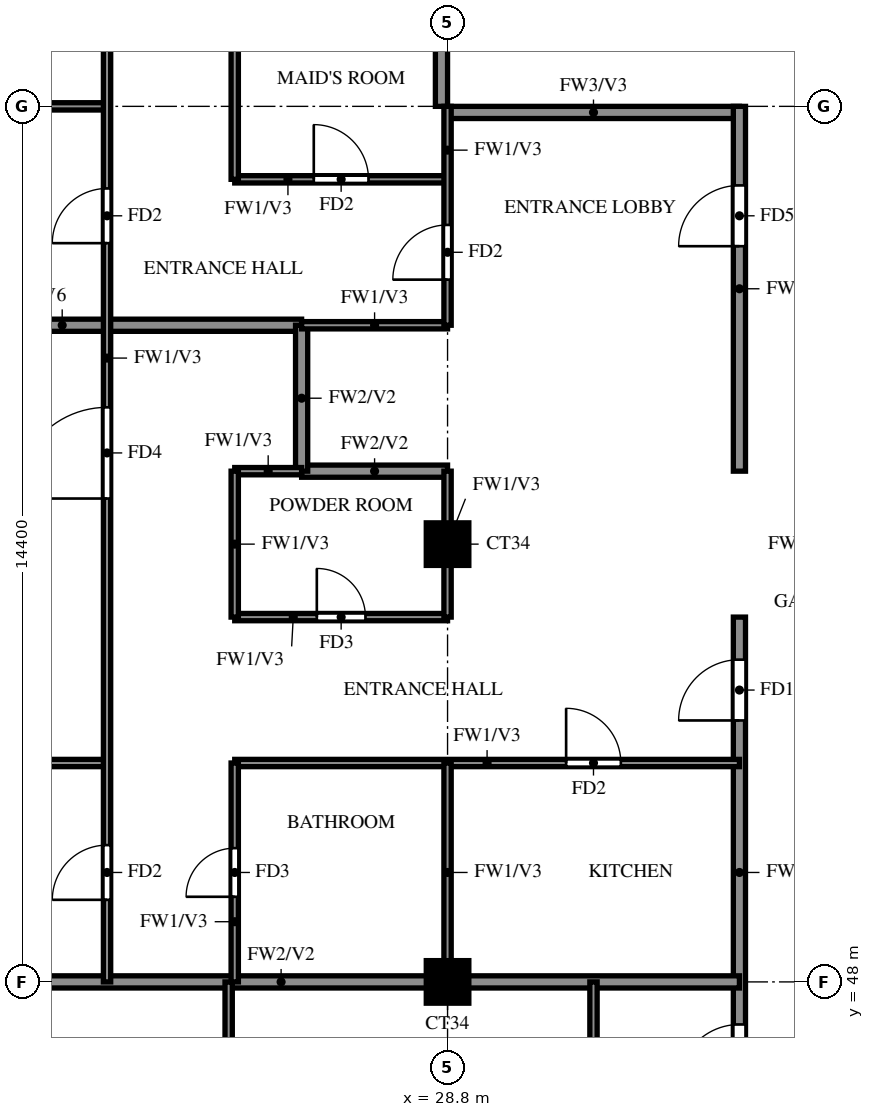
"""IFC4 building model, lengths in metres.
Left out: names, types, materials, properties, quantities, classifications, styles, units other than length and angle.
Written with IfcOpenShell. Run it as: python <this file> out.ifc"""

import sys

from ifc_helpers import new_model, si_unit, direction, frame, frame_2d, origin, origin_2d, place, context, subcontext, project, spatial, rectangle, extrude, source, transform, mapped, element, fill, save


model = new_model("IFC4")
c1 = context("Model", 3, precision=1e-05, world=origin(), true_north=direction((0.0, 1.0)))
c2 = subcontext(c1, "Body", "Model", "MODEL_VIEW")
j1 = project(units=[si_unit("LENGTHUNIT", "METRE"), si_unit("PLANEANGLEUNIT", "RADIAN")], contexts=[c1])
p1 = place(None, origin())
s1 = spatial("IfcSite", under=j1, at=p1, CompositionType="ELEMENT")
p2 = place(p1, origin())
s2 = spatial("IfcBuilding", under=s1, at=p2, CompositionType="ELEMENT")
p3 = place(p2, frame((0.0, 0.0, 257.0)))
s3 = spatial("IfcBuildingStorey", under=s2, at=p3, CompositionType="ELEMENT", Elevation=257.0)
m1 = source(origin(), c2, "Body", "SweptSolid", [
    extrude(rectangle(XDim=0.7, YDim=0.7, at=origin_2d()), origin(), (0.0, 0.0, 1.0), 3.22),
])
for number, where, z_axis, x_axis in (
    (1, (28.8, 48.0, 0.0), (0.0, 0.0, 1.0), (1.0, 0.0, 0.0)),
    (2, (28.8, 55.2, 0.0), (0.0, 0.0, 1.0), (1.0, 0.0, 0.0)),
):
    element("IfcColumn", number, at=place(p3, frame(where, z_axis=z_axis, x_axis=x_axis)), inside=s3, PredefinedType="COLUMN", context=c2, shape_type="MappedRepresentation", body=[
        mapped(m1, transform((0.0, 0.0, 0.0))),
    ])
p4 = place(p3, frame((28.8, 62.3, 0.0), z_axis=(0.0, 0.0, 1.0), x_axis=(1.0, 0.0, 0.0)))
e3 = element("IfcWall", 3, at=p4, inside=s3, PredefinedType="SOLIDWALL", context=c2, shape_type="SweptSolid", body=[
    extrude(rectangle(XDim=4.8, YDim=0.2, at=frame_2d((2.4, 0.0))), origin(), (0.0, 0.0, 1.0), 3.22),
])
p5 = place(p3, frame((28.7, 62.4, 0.0), z_axis=(0.0, 0.0, 1.0), x_axis=(0.0, 1.0, 0.0)))
e4 = element("IfcWall", 4, at=p5, inside=s3, PredefinedType="SOLIDWALL", context=c2, shape_type="SweptSolid", body=[
    extrude(rectangle(XDim=15.6, YDim=0.2, at=frame_2d((7.8, 0.0))), origin(), (0.0, 0.0, 1.0), 3.22),
])
p6 = place(p3, frame((33.6, 45.6, 0.0), z_axis=(0.0, 0.0, 1.0), x_axis=(0.0, 1.0, 0.0)))
e5 = element("IfcWall", 5, at=p6, inside=s3, PredefinedType="SOLIDWALL", context=c2, shape_type="SweptSolid", body=[
    extrude(rectangle(XDim=8.4, YDim=0.2, at=frame_2d((4.2, 0.0))), origin(), (0.0, 0.0, 1.0), 3.22),
])
p7 = place(p6, frame((0.7, 0.0, 0.0)))
e6 = element("IfcOpeningElement", 6, at=p7, cuts=e5, PredefinedType="OPENING", context=c2, shape_type="SweptSolid", body=[
    extrude(rectangle(XDim=1.0, YDim=2.1, at=frame_2d((0.5, 1.05))), frame((0.0, 0.11, 0.0), z_axis=(0.0, -1.0, 0.0), x_axis=(1.0, 0.0, 0.0)), (0.0, 0.0, 1.0), 0.22),
])
p8 = place(p6, frame((6.7, 0.0, 0.0)))
e7 = element("IfcOpeningElement", 7, at=p8, cuts=e5, PredefinedType="OPENING", context=c2, shape_type="SweptSolid", body=[
    extrude(rectangle(XDim=1.0, YDim=2.1, at=frame_2d((0.5, 1.05))), frame((0.0, 0.11, 0.0), z_axis=(0.0, -1.0, 0.0), x_axis=(1.0, 0.0, 0.0)), (0.0, 0.0, 1.0), 0.22),
])
p9 = place(p3, frame((33.6, 56.4, 0.0), z_axis=(0.0, 0.0, 1.0), x_axis=(0.0, 1.0, 0.0)))
e8 = element("IfcWall", 8, at=p9, inside=s3, PredefinedType="SOLIDWALL", context=c2, shape_type="SweptSolid", body=[
    extrude(rectangle(XDim=6.0, YDim=0.2, at=frame_2d((3.0, 0.0))), origin(), (0.0, 0.0, 1.0), 3.22),
])
p10 = place(p9, frame((3.7, 0.0, 0.0)))
e9 = element("IfcOpeningElement", 9, at=p10, cuts=e8, PredefinedType="OPENING", context=c2, shape_type="SweptSolid", body=[
    extrude(rectangle(XDim=1.0, YDim=2.1, at=frame_2d((0.5, 1.05))), frame((0.0, 0.11, 0.0), z_axis=(0.0, -1.0, 0.0), x_axis=(1.0, 0.0, 0.0)), (0.0, 0.0, 1.0), 0.22),
])
p11 = place(p3, frame((18.525, 48.0, 0.0), z_axis=(0.0, 0.0, 1.0), x_axis=(1.0, 0.0, 0.0)))
e10 = element("IfcWall", 10, at=p11, inside=s3, PredefinedType="SOLIDWALL", context=c2, shape_type="SweptSolid", body=[
    extrude(rectangle(XDim=15.075, YDim=0.2, at=frame_2d((7.538, 0.0))), origin(), (0.0, 0.0, 1.0), 3.22),
])
p12 = place(p3, frame((26.4, 56.4, 0.0), z_axis=(0.0, 0.0, 1.0), x_axis=(1.0, 0.0, 0.0)))
e11 = element("IfcWall", 11, at=p12, inside=s3, PredefinedType="SOLIDWALL", context=c2, shape_type="SweptSolid", body=[
    extrude(rectangle(XDim=2.4, YDim=0.2, at=frame_2d((1.2, 0.0))), origin(), (0.0, 0.0, 1.0), 3.22),
])
p13 = place(p3, frame((18.525, 58.8, 0.0), z_axis=(0.0, 0.0, 1.0), x_axis=(1.0, 0.0, 0.0)))
e12 = element("IfcWall", 12, at=p13, inside=s3, PredefinedType="SOLIDWALL", context=c2, shape_type="SweptSolid", body=[
    extrude(rectangle(XDim=7.875, YDim=0.2, at=frame_2d((3.938, 0.0))), origin(), (0.0, 0.0, 1.0), 2.32),
])
p14 = place(p3, frame((26.4, 56.4, 0.0), z_axis=(0.0, 0.0, 1.0), x_axis=(0.0, 1.0, 0.0)))
e13 = element("IfcWall", 13, at=p14, inside=s3, PredefinedType="SOLIDWALL", context=c2, shape_type="SweptSolid", body=[
    extrude(rectangle(XDim=2.4, YDim=0.2, at=frame_2d((1.2, 0.0))), origin(), (0.0, 0.0, 1.0), 3.22),
])
p15 = place(p3, frame((18.525, 51.6, 0.0), z_axis=(0.0, 0.0, 1.0), x_axis=(1.0, 0.0, 0.0)))
e14 = element("IfcWall", 14, at=p15, inside=s3, PredefinedType="PARTITIONING", context=c2, shape_type="SweptSolid", body=[
    extrude(rectangle(XDim=4.675, YDim=0.12, at=frame_2d((2.337, 0.0))), origin(), (0.0, 0.0, 1.0), 2.32),
])
p16 = place(p3, frame((25.3, 51.6, 0.0), z_axis=(0.0, 0.0, 1.0), x_axis=(1.0, 0.0, 0.0)))
e15 = element("IfcWall", 15, at=p16, inside=s3, PredefinedType="PARTITIONING", context=c2, shape_type="SweptSolid", body=[
    extrude(rectangle(XDim=8.3, YDim=0.12, at=frame_2d((4.15, 0.0))), origin(), (0.0, 0.0, 1.0), 3.22),
])
p17 = place(p16, frame((5.45, 0.0, 0.0)))
e16 = element("IfcOpeningElement", 16, at=p17, cuts=e15, PredefinedType="OPENING", context=c2, shape_type="SweptSolid", body=[
    extrude(rectangle(XDim=0.9, YDim=2.1, at=frame_2d((0.45, 1.05))), frame((0.0, 0.07, 0.0), z_axis=(0.0, -1.0, 0.0), x_axis=(1.0, 0.0, 0.0)), (0.0, 0.0, 1.0), 0.14),
])
p18 = place(p3, frame((25.3, 54.0, 0.0), z_axis=(0.0, 0.0, 1.0), x_axis=(1.0, 0.0, 0.0)))
e17 = element("IfcWall", 17, at=p18, inside=s3, PredefinedType="PARTITIONING", context=c2, shape_type="SweptSolid", body=[
    extrude(rectangle(XDim=3.5, YDim=0.12, at=frame_2d((1.75, 0.0))), origin(), (0.0, 0.0, 1.0), 3.22),
])
p19 = place(p18, frame((1.35, 0.0, 0.0)))
e18 = element("IfcOpeningElement", 18, at=p19, cuts=e17, PredefinedType="OPENING", context=c2, shape_type="SweptSolid", body=[
    extrude(rectangle(XDim=0.8, YDim=2.1, at=frame_2d((0.4, 1.05))), frame((0.0, 0.07, 0.0), z_axis=(0.0, -1.0, 0.0), x_axis=(1.0, 0.0, 0.0)), (0.0, 0.0, 1.0), 0.14),
])
p20 = place(p3, frame((25.3, 56.4, 0.0), z_axis=(0.0, 0.0, 1.0), x_axis=(1.0, 0.0, 0.0)))
e19 = element("IfcWall", 19, at=p20, inside=s3, PredefinedType="PARTITIONING", context=c2, shape_type="SweptSolid", body=[
    extrude(rectangle(XDim=1.1, YDim=0.12, at=frame_2d((0.55, 0.0))), origin(), (0.0, 0.0, 1.0), 3.22),
])
p21 = place(p3, frame((26.4, 58.8, 0.0), z_axis=(0.0, 0.0, 1.0), x_axis=(1.0, 0.0, 0.0)))
e20 = element("IfcWall", 20, at=p21, inside=s3, PredefinedType="PARTITIONING", context=c2, shape_type="SweptSolid", body=[
    extrude(rectangle(XDim=2.4, YDim=0.12, at=frame_2d((1.2, 0.0))), origin(), (0.0, 0.0, 1.0), 3.22),
])
p22 = place(p3, frame((25.3, 61.2, 0.0), z_axis=(0.0, 0.0, 1.0), x_axis=(1.0, 0.0, 0.0)))
e21 = element("IfcWall", 21, at=p22, inside=s3, PredefinedType="PARTITIONING", context=c2, shape_type="SweptSolid", body=[
    extrude(rectangle(XDim=3.5, YDim=0.12, at=frame_2d((1.75, 0.0))), origin(), (0.0, 0.0, 1.0), 3.22),
])
p23 = place(p22, frame((1.3, 0.0, 0.0)))
e22 = element("IfcOpeningElement", 22, at=p23, cuts=e21, PredefinedType="OPENING", context=c2, shape_type="SweptSolid", body=[
    extrude(rectangle(XDim=0.9, YDim=2.1, at=frame_2d((0.45, 1.05))), frame((0.0, 0.07, 0.0), z_axis=(0.0, -1.0, 0.0), x_axis=(1.0, 0.0, 0.0)), (0.0, 0.0, 1.0), 0.14),
])
p24 = place(p3, frame((18.525, 62.4, 0.0), z_axis=(0.0, 0.0, 1.0), x_axis=(1.0, 0.0, 0.0)))
e23 = element("IfcWall", 23, at=p24, inside=s3, PredefinedType="PARTITIONING", context=c2, shape_type="SweptSolid", body=[
    extrude(rectangle(XDim=4.675, YDim=0.12, at=frame_2d((2.337, 0.0))), origin(), (0.0, 0.0, 1.0), 3.22),
])
p25 = place(p3, frame((23.2, 48.0, 0.0), z_axis=(0.0, 0.0, 1.0), x_axis=(0.0, 1.0, 0.0)))
e24 = element("IfcWall", 24, at=p25, inside=s3, PredefinedType="PARTITIONING", context=c2, shape_type="SweptSolid", body=[
    extrude(rectangle(XDim=21.6, YDim=0.12, at=frame_2d((10.8, 0.0))), origin(), (0.0, 0.0, 1.0), 3.22),
])
p26 = place(p25, frame((1.35, 0.0, 0.0)))
e25 = element("IfcOpeningElement", 25, at=p26, cuts=e24, PredefinedType="OPENING", context=c2, shape_type="SweptSolid", body=[
    extrude(rectangle(XDim=0.9, YDim=2.1, at=frame_2d((0.45, 1.05))), frame((0.0, 0.07, 0.0), z_axis=(0.0, -1.0, 0.0), x_axis=(1.0, 0.0, 0.0)), (0.0, 0.0, 1.0), 0.14),
])
p27 = place(p25, frame((7.95, 0.0, 0.0)))
e26 = element("IfcOpeningElement", 26, at=p27, cuts=e24, PredefinedType="OPENING", context=c2, shape_type="SweptSolid", body=[
    extrude(rectangle(XDim=1.5, YDim=2.1, at=frame_2d((0.75, 1.05))), frame((0.0, 0.07, 0.0), z_axis=(0.0, -1.0, 0.0), x_axis=(1.0, 0.0, 0.0)), (0.0, 0.0, 1.0), 0.14),
])
p28 = place(p25, frame((12.15, 0.0, 0.0)))
e27 = element("IfcOpeningElement", 27, at=p28, cuts=e24, PredefinedType="OPENING", context=c2, shape_type="SweptSolid", body=[
    extrude(rectangle(XDim=0.9, YDim=2.1, at=frame_2d((0.45, 1.05))), frame((0.0, 0.07, 0.0), z_axis=(0.0, -1.0, 0.0), x_axis=(1.0, 0.0, 0.0)), (0.0, 0.0, 1.0), 0.14),
])
p29 = place(p25, frame((17.55, 0.0, 0.0)))
e28 = element("IfcOpeningElement", 28, at=p29, cuts=e24, PredefinedType="OPENING", context=c2, shape_type="SweptSolid", body=[
    extrude(rectangle(XDim=0.9, YDim=2.1, at=frame_2d((0.45, 1.05))), frame((0.0, 0.07, 0.0), z_axis=(0.0, -1.0, 0.0), x_axis=(1.0, 0.0, 0.0)), (0.0, 0.0, 1.0), 0.14),
])
p30 = place(p3, frame((25.2, 39.725, 0.0), z_axis=(0.0, 0.0, 1.0), x_axis=(0.0, 1.0, 0.0)))
e29 = element("IfcWall", 29, at=p30, inside=s3, PredefinedType="PARTITIONING", context=c2, shape_type="SweptSolid", body=[
    extrude(rectangle(XDim=8.275, YDim=0.12, at=frame_2d((4.137, 0.0))), origin(), (0.0, 0.0, 1.0), 3.22),
])
p31 = place(p30, frame((4.525, 0.0, 0.0)))
e30 = element("IfcOpeningElement", 30, at=p31, cuts=e29, PredefinedType="OPENING", context=c2, shape_type="SweptSolid", body=[
    extrude(rectangle(XDim=0.9, YDim=2.1, at=frame_2d((0.45, 1.05))), frame((0.0, 0.07, 0.0), z_axis=(0.0, -1.0, 0.0), x_axis=(1.0, 0.0, 0.0)), (0.0, 0.0, 1.0), 0.14),
])
p32 = place(p3, frame((25.3, 48.0, 0.0), z_axis=(0.0, 0.0, 1.0), x_axis=(0.0, 1.0, 0.0)))
e31 = element("IfcWall", 31, at=p32, inside=s3, PredefinedType="PARTITIONING", context=c2, shape_type="SweptSolid", body=[
    extrude(rectangle(XDim=3.6, YDim=0.12, at=frame_2d((1.8, 0.0))), origin(), (0.0, 0.0, 1.0), 3.22),
])
p33 = place(p32, frame((1.4, 0.0, 0.0)))
e32 = element("IfcOpeningElement", 32, at=p33, cuts=e31, PredefinedType="OPENING", context=c2, shape_type="SweptSolid", body=[
    extrude(rectangle(XDim=0.8, YDim=2.1, at=frame_2d((0.4, 1.05))), frame((0.0, 0.07, 0.0), z_axis=(0.0, -1.0, 0.0), x_axis=(1.0, 0.0, 0.0)), (0.0, 0.0, 1.0), 0.14),
])
p34 = place(p3, frame((25.3, 54.0, 0.0), z_axis=(0.0, 0.0, 1.0), x_axis=(0.0, 1.0, 0.0)))
e33 = element("IfcWall", 33, at=p34, inside=s3, PredefinedType="PARTITIONING", context=c2, shape_type="SweptSolid", body=[
    extrude(rectangle(XDim=2.4, YDim=0.12, at=frame_2d((1.2, 0.0))), origin(), (0.0, 0.0, 1.0), 3.22),
])
p35 = place(p3, frame((25.3, 61.2, 0.0), z_axis=(0.0, 0.0, 1.0), x_axis=(0.0, 1.0, 0.0)))
e34 = element("IfcWall", 34, at=p35, inside=s3, PredefinedType="PARTITIONING", context=c2, shape_type="SweptSolid", body=[
    extrude(rectangle(XDim=12.0, YDim=0.12, at=frame_2d((6.0, 0.0))), origin(), (0.0, 0.0, 1.0), 3.22),
])
p36 = place(p35, frame((5.3, 0.0, 0.0)))
e35 = element("IfcOpeningElement", 35, at=p36, cuts=e34, PredefinedType="OPENING", context=c2, shape_type="SweptSolid", body=[
    extrude(rectangle(XDim=0.9, YDim=2.1, at=frame_2d((0.45, 1.05))), frame((0.0, 0.07, 0.0), z_axis=(0.0, -1.0, 0.0), x_axis=(1.0, 0.0, 0.0)), (0.0, 0.0, 1.0), 0.14),
])
p37 = place(p35, frame((9.7, 0.0, 0.0)))
e36 = element("IfcOpeningElement", 36, at=p37, cuts=e34, PredefinedType="OPENING", context=c2, shape_type="SweptSolid", body=[
    extrude(rectangle(XDim=0.8, YDim=2.1, at=frame_2d((0.4, 1.05))), frame((0.0, 0.07, 0.0), z_axis=(0.0, -1.0, 0.0), x_axis=(1.0, 0.0, 0.0)), (0.0, 0.0, 1.0), 0.14),
])
p38 = place(p3, frame((28.8, 48.0, 0.0), z_axis=(0.0, 0.0, 1.0), x_axis=(0.0, 1.0, 0.0)))
e37 = element("IfcWall", 37, at=p38, inside=s3, PredefinedType="PARTITIONING", context=c2, shape_type="SweptSolid", body=[
    extrude(rectangle(XDim=3.6, YDim=0.12, at=frame_2d((1.8, 0.0))), origin(), (0.0, 0.0, 1.0), 3.22),
])
p39 = place(p3, frame((28.8, 54.0, 0.0), z_axis=(0.0, 0.0, 1.0), x_axis=(0.0, 1.0, 0.0)))
e38 = element("IfcWall", 38, at=p39, inside=s3, PredefinedType="PARTITIONING", context=c2, shape_type="SweptSolid", body=[
    extrude(rectangle(XDim=2.4, YDim=0.12, at=frame_2d((1.2, 0.0))), origin(), (0.0, 0.0, 1.0), 3.22),
])
p40 = place(p3, frame((28.8, 58.8, 0.0), z_axis=(0.0, 0.0, 1.0), x_axis=(0.0, 1.0, 0.0)))
e39 = element("IfcWall", 39, at=p40, inside=s3, PredefinedType="PARTITIONING", context=c2, shape_type="SweptSolid", body=[
    extrude(rectangle(XDim=3.6, YDim=0.12, at=frame_2d((1.8, 0.0))), origin(), (0.0, 0.0, 1.0), 3.22),
])
p41 = place(p40, frame((0.75, 0.0, 0.0)))
e40 = element("IfcOpeningElement", 40, at=p41, cuts=e39, PredefinedType="OPENING", context=c2, shape_type="SweptSolid", body=[
    extrude(rectangle(XDim=0.9, YDim=2.1, at=frame_2d((0.45, 1.05))), frame((0.0, 0.07, 0.0), z_axis=(0.0, -1.0, 0.0), x_axis=(1.0, 0.0, 0.0)), (0.0, 0.0, 1.0), 0.14),
])
p42 = place(p3, frame((31.2, 45.6, 0.0), z_axis=(0.0, 0.0, 1.0), x_axis=(0.0, 1.0, 0.0)))
e41 = element("IfcWall", 41, at=p42, inside=s3, PredefinedType="PARTITIONING", context=c2, shape_type="SweptSolid", body=[
    extrude(rectangle(XDim=2.4, YDim=0.12, at=frame_2d((1.2, 0.0))), origin(), (0.0, 0.0, 1.0), 3.22),
])
p43 = place(p7, origin())
e42 = element("IfcDoor", 42, at=p43, inside=s3, OperationType="SINGLE_SWING_RIGHT", PredefinedType="DOOR", context=c2, shape_type="SweptSolid", body=[
    extrude(rectangle(XDim=1.0, YDim=2.1, at=frame_2d((0.5, 1.05))), frame((0.0, 0.025, 0.0), z_axis=(0.0, -1.0, 0.0), x_axis=(1.0, 0.0, 0.0)), (0.0, 0.0, 1.0), 0.05),
])
fill(e6, e42)
p44 = place(p8, origin())
e43 = element("IfcDoor", 43, at=p44, inside=s3, OperationType="SINGLE_SWING_RIGHT", PredefinedType="DOOR", context=c2, shape_type="SweptSolid", body=[
    extrude(rectangle(XDim=1.0, YDim=2.1, at=frame_2d((0.5, 1.05))), frame((0.0, 0.025, 0.0), z_axis=(0.0, -1.0, 0.0), x_axis=(1.0, 0.0, 0.0)), (0.0, 0.0, 1.0), 0.05),
])
fill(e7, e43)
p45 = place(p26, origin())
e44 = element("IfcDoor", 44, at=p45, inside=s3, OperationType="SINGLE_SWING_LEFT", PredefinedType="DOOR", context=c2, shape_type="SweptSolid", body=[
    extrude(rectangle(XDim=0.9, YDim=2.1, at=frame_2d((0.45, 1.05))), frame((0.0, 0.025, 0.0), z_axis=(0.0, -1.0, 0.0), x_axis=(1.0, 0.0, 0.0)), (0.0, 0.0, 1.0), 0.05),
])
fill(e25, e44)
p46 = place(p27, origin())
e45 = element("IfcDoor", 45, at=p46, inside=s3, OperationType="SINGLE_SWING_RIGHT", PredefinedType="DOOR", context=c2, shape_type="SweptSolid", body=[
    extrude(rectangle(XDim=1.5, YDim=2.1, at=frame_2d((0.75, 1.05))), frame((0.0, 0.025, 0.0), z_axis=(0.0, -1.0, 0.0), x_axis=(1.0, 0.0, 0.0)), (0.0, 0.0, 1.0), 0.05),
])
fill(e26, e45)
p47 = place(p33, origin())
e46 = element("IfcDoor", 46, at=p47, inside=s3, OperationType="SINGLE_SWING_RIGHT", PredefinedType="DOOR", context=c2, shape_type="SweptSolid", body=[
    extrude(rectangle(XDim=0.8, YDim=2.1, at=frame_2d((0.4, 1.05))), frame((0.0, 0.025, 0.0), z_axis=(0.0, -1.0, 0.0), x_axis=(1.0, 0.0, 0.0)), (0.0, 0.0, 1.0), 0.05),
])
fill(e32, e46)
p48 = place(p19, origin())
e47 = element("IfcDoor", 47, at=p48, inside=s3, OperationType="SINGLE_SWING_LEFT", PredefinedType="DOOR", context=c2, shape_type="SweptSolid", body=[
    extrude(rectangle(XDim=0.8, YDim=2.1, at=frame_2d((0.4, 1.05))), frame((0.0, 0.025, 0.0), z_axis=(0.0, -1.0, 0.0), x_axis=(1.0, 0.0, 0.0)), (0.0, 0.0, 1.0), 0.05),
])
fill(e18, e47)
p49 = place(p17, origin())
e48 = element("IfcDoor", 48, at=p49, inside=s3, OperationType="SINGLE_SWING_LEFT", PredefinedType="DOOR", context=c2, shape_type="SweptSolid", body=[
    extrude(rectangle(XDim=0.9, YDim=2.1, at=frame_2d((0.45, 1.05))), frame((0.0, 0.025, 0.0), z_axis=(0.0, -1.0, 0.0), x_axis=(1.0, 0.0, 0.0)), (0.0, 0.0, 1.0), 0.05),
])
fill(e16, e48)
p50 = place(p41, origin())
e49 = element("IfcDoor", 49, at=p50, inside=s3, OperationType="SINGLE_SWING_LEFT", PredefinedType="DOOR", context=c2, shape_type="SweptSolid", body=[
    extrude(rectangle(XDim=0.9, YDim=2.1, at=frame_2d((0.45, 1.05))), frame((0.0, 0.025, 0.0), z_axis=(0.0, -1.0, 0.0), x_axis=(1.0, 0.0, 0.0)), (0.0, 0.0, 1.0), 0.05),
])
fill(e40, e49)
p51 = place(p10, origin())
e50 = element("IfcDoor", 50, at=p51, inside=s3, OperationType="SINGLE_SWING_LEFT", PredefinedType="DOOR", context=c2, shape_type="SweptSolid", body=[
    extrude(rectangle(XDim=1.0, YDim=2.1, at=frame_2d((0.5, 1.05))), frame((0.0, 0.025, 0.0), z_axis=(0.0, -1.0, 0.0), x_axis=(1.0, 0.0, 0.0)), (0.0, 0.0, 1.0), 0.05),
])
fill(e9, e50)
p52 = place(p28, origin())
e51 = element("IfcDoor", 51, at=p52, inside=s3, OperationType="SINGLE_SWING_RIGHT", PredefinedType="DOOR", context=c2, shape_type="SweptSolid", body=[
    extrude(rectangle(XDim=0.9, YDim=2.1, at=frame_2d((0.45, 1.05))), frame((0.0, 0.025, 0.0), z_axis=(0.0, -1.0, 0.0), x_axis=(1.0, 0.0, 0.0)), (0.0, 0.0, 1.0), 0.05),
])
fill(e27, e51)
p53 = place(p23, origin())
e52 = element("IfcDoor", 52, at=p53, inside=s3, OperationType="SINGLE_SWING_LEFT", PredefinedType="DOOR", context=c2, shape_type="SweptSolid", body=[
    extrude(rectangle(XDim=0.9, YDim=2.1, at=frame_2d((0.45, 1.05))), frame((0.0, 0.025, 0.0), z_axis=(0.0, -1.0, 0.0), x_axis=(1.0, 0.0, 0.0)), (0.0, 0.0, 1.0), 0.05),
])
fill(e22, e52)
save(model, sys.argv[1])
